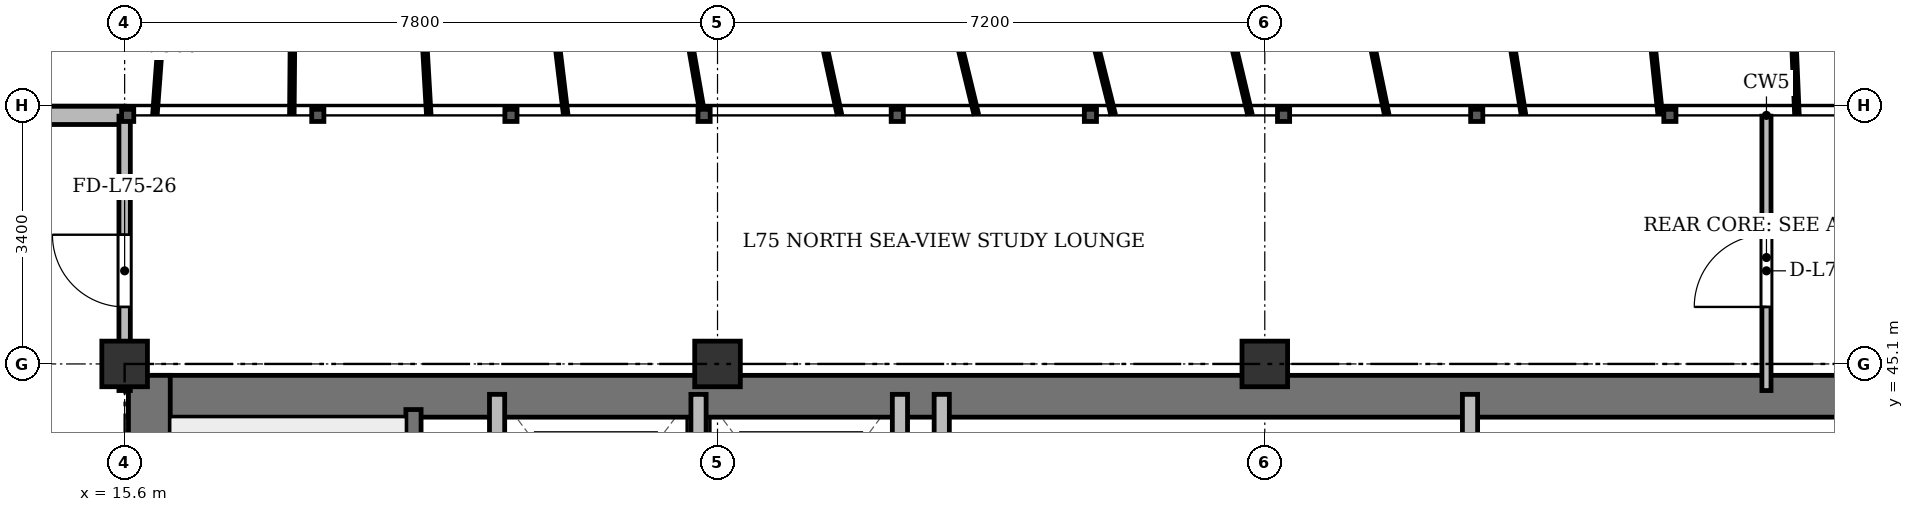
"""IFC4 building model, lengths in metres.
Left out: names, types, materials, properties, quantities, classifications, styles, units other than length and angle.
Written with IfcOpenShell. Run it as: python <this file> out.ifc"""

import sys

from ifc_helpers import new_model, si_unit, direction, frame, frame_2d, origin, origin_2d, place, context, subcontext, project, spatial, rectangle, extrude, source, transform, mapped, element, fill, save


model = new_model("IFC4")
c1 = context("Model", 3, precision=1e-05, world=origin(), true_north=direction((0.0, 1.0)))
c2 = subcontext(c1, "Body", "Model", "MODEL_VIEW")
j1 = project(units=[si_unit("LENGTHUNIT", "METRE"), si_unit("PLANEANGLEUNIT", "RADIAN")], contexts=[c1])
p1 = place(None, origin())
s1 = spatial("IfcSite", under=j1, at=p1, CompositionType="ELEMENT")
p2 = place(p1, origin())
s2 = spatial("IfcBuilding", under=s1, at=p2, CompositionType="ELEMENT")
p3 = place(p2, frame((0.0, 0.0, 288.3)))
s3 = spatial("IfcBuildingStorey", under=s2, at=p3, CompositionType="ELEMENT", Elevation=288.3)
m1 = source(origin(), c2, "Body", "SweptSolid", [
    extrude(rectangle(XDim=0.6, YDim=0.6, at=origin_2d()), origin(), (0.0, 0.0, 1.0), 3.6),
])
for number, where, z_axis, x_axis in (
    (1, (15.6, 45.1, 0.0), (0.0, 0.0, 1.0), (1.0, 0.0, 0.0)),
    (2, (23.4, 45.1, 0.0), (0.0, 0.0, 1.0), (1.0, 0.0, 0.0)),
    (3, (30.6, 45.1, 0.0), (0.0, 0.0, 1.0), (1.0, 0.0, 0.0)),
):
    element("IfcColumn", number, at=place(p3, frame(where, z_axis=z_axis, x_axis=x_axis)), inside=s3, PredefinedType="COLUMN", context=c2, shape_type="MappedRepresentation", body=[
        mapped(m1, transform((0.0, 0.0, 0.0), x_axis=(1.0, 0.0, 0.0), y_axis=(0.0, 1.0, 0.0), z_axis=(0.0, 0.0, 1.0), scale=1.0)),
    ])
p4 = place(p3, frame((11.3, 48.37, 0.0), z_axis=(0.0, 0.0, 1.0), x_axis=(1.0, 0.0, 0.0)))
e4 = element("IfcWall", 4, at=p4, inside=s3, PredefinedType="SOLIDWALL", context=c2, shape_type="SweptSolid", body=[
    extrude(rectangle(XDim=4.3, YDim=0.24, at=frame_2d((2.15, 0.0))), origin(), (0.0, 0.0, 1.0), 3.37),
])
p5 = place(p4, frame((1.475, 0.0, 0.9)))
e5 = element("IfcOpeningElement", 5, at=p5, cuts=e4, PredefinedType="OPENING", context=c2, shape_type="SweptSolid", body=[
    extrude(rectangle(XDim=1.35, YDim=1.5, at=frame_2d((0.675, 0.75))), frame((0.0, 0.13, 0.0), z_axis=(0.0, -1.0, 0.0), x_axis=(1.0, 0.0, 0.0)), (0.0, 0.0, 1.0), 0.26),
])
p6 = place(p3, frame((15.65, 44.675, 0.0), z_axis=(0.0, 0.0, 1.0), x_axis=(1.0, 0.0, 0.0)))
e6 = element("IfcWall", 6, at=p6, inside=s3, PredefinedType="SHEAR", context=c2, shape_type="SweptSolid", body=[
    extrude(rectangle(XDim=43.1, YDim=0.55, at=frame_2d((21.55, 0.0))), origin(), (0.0, 0.0, 1.0), 3.37),
])
p7 = place(p3, frame((15.925, 33.4, 0.0), z_axis=(0.0, 0.0, 1.0), x_axis=(0.0, 1.0, 0.0)))
e7 = element("IfcWall", 7, at=p7, inside=s3, PredefinedType="SHEAR", context=c2, shape_type="SweptSolid", body=[
    extrude(rectangle(XDim=11.55, YDim=0.55, at=frame_2d((5.775, 0.0))), origin(), (0.0, 0.0, 1.0), 3.37),
])
p8 = place(p3, frame((19.4, 33.4, 0.0), z_axis=(0.0, 0.0, 1.0), x_axis=(0.0, 1.0, 0.0)))
e8 = element("IfcWall", 8, at=p8, inside=s3, PredefinedType="SHEAR", context=c2, shape_type="SweptSolid", body=[
    extrude(rectangle(XDim=11.1, YDim=0.2, at=frame_2d((5.55, 0.0))), origin(), (0.0, 0.0, 1.0), 3.37),
])
p9 = place(p8, frame((0.85, 0.0, 0.0)))
e9 = element("IfcOpeningElement", 9, at=p9, cuts=e8, PredefinedType="OPENING", context=c2, shape_type="SweptSolid", body=[
    extrude(rectangle(XDim=1.1, YDim=2.15, at=frame_2d((0.55, 1.075))), frame((0.0, 0.11, 0.0), z_axis=(0.0, -1.0, 0.0), x_axis=(1.0, 0.0, 0.0)), (0.0, 0.0, 1.0), 0.22),
])
for number, where, z_axis, x_axis in (
    (10, (20.5, 41.3, 0.0), (0.0, 0.0, 1.0), (0.0, 1.0, 0.0)),
    (11, (23.15, 41.3, 0.0), (0.0, 0.0, 1.0), (0.0, 1.0, 0.0)),
    (12, (25.8, 41.3, 0.0), (0.0, 0.0, 1.0), (0.0, 1.0, 0.0)),
):
    element("IfcWall", number, at=place(p3, frame(where, z_axis=z_axis, x_axis=x_axis)), inside=s3, PredefinedType="SOLIDWALL", context=c2, shape_type="SweptSolid", body=[
        extrude(rectangle(XDim=3.4, YDim=0.2, at=frame_2d((1.7, 0.0))), origin(), (0.0, 0.0, 1.0), 3.37),
    ])
for number, where, z_axis, x_axis in (
    (13, (26.35, 33.4, 0.0), (0.0, 0.0, 1.0), (0.0, 1.0, 0.0)),
    (14, (33.3, 33.4, 0.0), (0.0, 0.0, 1.0), (0.0, 1.0, 0.0)),
):
    element("IfcWall", number, at=place(p3, frame(where, z_axis=z_axis, x_axis=x_axis)), inside=s3, PredefinedType="SOLIDWALL", context=c2, shape_type="SweptSolid", body=[
        extrude(rectangle(XDim=11.3, YDim=0.2, at=frame_2d((5.65, 0.0))), origin(), (0.0, 0.0, 1.0), 2.92),
    ])
p10 = place(p3, frame((37.2, 44.75, 0.0), z_axis=(0.0, 0.0, 1.0), x_axis=(0.0, 1.0, 0.0)))
e15 = element("IfcWall", 15, at=p10, inside=s3, PredefinedType="PARTITIONING", context=c2, shape_type="SweptSolid", body=[
    extrude(rectangle(XDim=3.61, YDim=0.12, at=frame_2d((1.805, 0.0))), origin(), (0.0, 0.0, 1.0), 2.92),
])
p11 = place(p10, frame((1.1, 0.0, 0.0)))
e16 = element("IfcOpeningElement", 16, at=p11, cuts=e15, PredefinedType="OPENING", context=c2, shape_type="SweptSolid", body=[
    extrude(rectangle(XDim=0.95, YDim=2.15, at=frame_2d((0.475, 1.075))), frame((0.0, 0.07, 0.0), z_axis=(0.0, -1.0, 0.0), x_axis=(1.0, 0.0, 0.0)), (0.0, 0.0, 1.0), 0.14),
])
p12 = place(p3, frame((15.6, 44.75, 0.0), z_axis=(0.0, 0.0, 1.0), x_axis=(0.0, 1.0, 0.0)))
e17 = element("IfcWall", 17, at=p12, inside=s3, PredefinedType="PARTITIONING", context=c2, shape_type="SweptSolid", body=[
    extrude(rectangle(XDim=3.61, YDim=0.15, at=frame_2d((1.805, 0.0))), origin(), (0.0, 0.0, 1.0), 2.87),
])
p13 = place(p12, frame((1.1, 0.0, 0.0)))
e18 = element("IfcOpeningElement", 18, at=p13, cuts=e17, PredefinedType="OPENING", context=c2, shape_type="SweptSolid", body=[
    extrude(rectangle(XDim=0.95, YDim=2.15, at=frame_2d((0.475, 1.075))), frame((0.0, 0.085, 0.0), z_axis=(0.0, -1.0, 0.0), x_axis=(1.0, 0.0, 0.0)), (0.0, 0.0, 1.0), 0.17),
])
m2 = source(origin(), c2, "Body", "SweptSolid", [
    extrude(rectangle(XDim=0.95, YDim=2.15, at=frame_2d((0.475, 1.075))), frame((0.0, 0.025, 0.0), z_axis=(0.0, -1.0, 0.0), x_axis=(1.0, 0.0, 0.0)), (0.0, 0.0, 1.0), 0.05),
])
p14 = place(p11, origin())
e19 = element("IfcDoor", 19, at=p14, inside=s3, OperationType="SINGLE_SWING_LEFT", PredefinedType="DOOR", context=c2, shape_type="MappedRepresentation", body=[
    mapped(m2, transform((0.0, 0.0, 0.0), x_axis=(1.0, 0.0, 0.0), y_axis=(0.0, 1.0, 0.0), z_axis=(0.0, 0.0, 1.0), scale=1.0)),
])
fill(e16, e19)
p15 = place(p13, origin())
e20 = element("IfcDoor", 20, at=p15, inside=s3, OperationType="SINGLE_SWING_RIGHT", PredefinedType="DOOR", context=c2, shape_type="MappedRepresentation", body=[
    mapped(m2, transform((0.0, 0.0, 0.0), x_axis=(1.0, 0.0, 0.0), y_axis=(0.0, 1.0, 0.0), z_axis=(0.0, 0.0, 1.0), scale=1.0)),
])
fill(e18, e20)
save(model, sys.argv[1])
